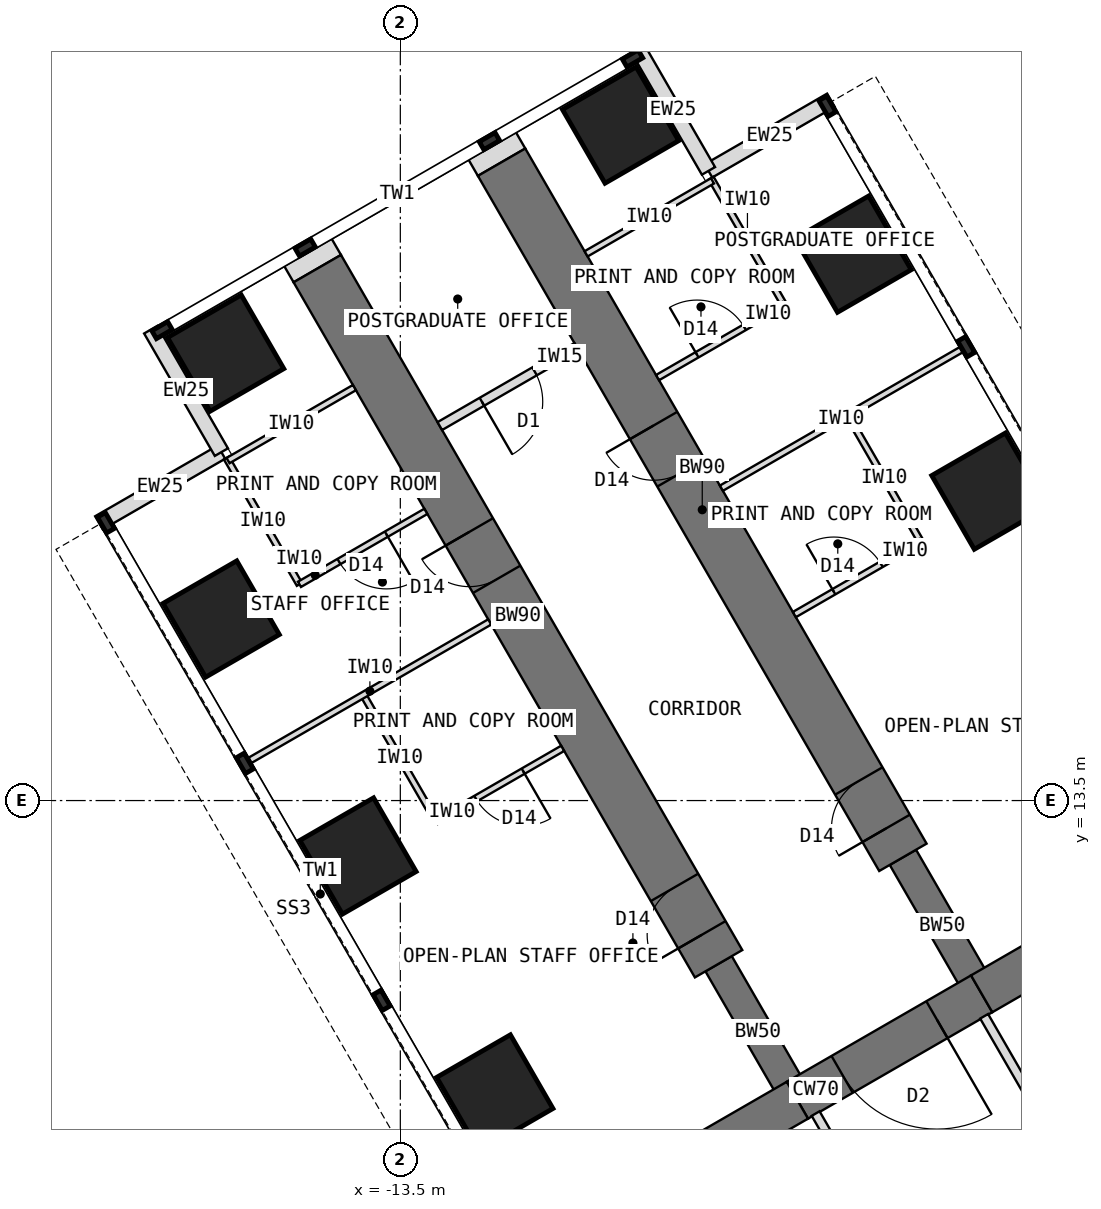
"""IFC4 building model, lengths in metres.
Left out: names, types, materials, properties, quantities, classifications, styles, units other than length and angle.
Written with IfcOpenShell. Run it as: python <this file> out.ifc"""

import sys

from ifc_helpers import new_model, si_unit, direction, frame, frame_2d, origin, origin_2d, place, context, subcontext, project, spatial, rectangle, extrude, element, fill, save


model = new_model("IFC4")
c1 = context("Model", 3, precision=1e-05, world=origin(), true_north=direction((0.0, 1.0)))
c2 = subcontext(c1, "Body", "Model", "MODEL_VIEW")
j1 = project(units=[si_unit("LENGTHUNIT", "METRE"), si_unit("PLANEANGLEUNIT", "RADIAN")], contexts=[c1])
p1 = place(None, origin())
s1 = spatial("IfcSite", under=j1, at=p1, CompositionType="ELEMENT")
p2 = place(p1, origin())
s2 = spatial("IfcBuilding", under=s1, at=p2, CompositionType="ELEMENT")
p3 = place(p2, frame((0.0, 0.0, 72.5)))
s3 = spatial("IfcBuildingStorey", under=s2, at=p3, CompositionType="ELEMENT", Elevation=72.5)
p4 = place(p3, frame((0.0, 12.596, 0.0), z_axis=(0.0, 0.0, 1.0), x_axis=(-0.866011268655, -0.500024481964, 0.0)))
e1 = element("IfcWall", 1, at=p4, inside=s3, PredefinedType="SHEAR", context=c2, shape_type="SweptSolid", body=[
    extrude(rectangle(XDim=4.548, YDim=0.7, at=frame_2d((2.274, 0.0))), origin(), (0.0, 0.0, 1.0), 4.0),
])
p5 = place(p3, frame((-3.939, 10.322, 0.0), z_axis=(0.0, 0.0, 1.0), x_axis=(-0.866019471182, -0.500010275428, 0.0)))
e2 = element("IfcWall", 2, at=p5, inside=s3, PredefinedType="SHEAR", context=c2, shape_type="SweptSolid", body=[
    extrude(rectangle(XDim=3.5, YDim=0.7, at=frame_2d((1.75, 0.0))), origin(), (0.0, 0.0, 1.0), 4.0),
])
p6 = place(p5, frame((0.85, 0.0, 0.0)))
e3 = element("IfcOpeningElement", 3, at=p6, cuts=e2, PredefinedType="OPENING", context=c2, shape_type="SweptSolid", body=[
    extrude(rectangle(XDim=1.8, YDim=2.1, at=frame_2d((0.9, 1.05))), frame((0.0, 0.36, 0.0), z_axis=(0.0, -1.0, 0.0), x_axis=(1.0, 0.0, 0.0)), (0.0, 0.0, 1.0), 0.72),
])
p7 = place(p3, frame((-6.97, 8.572, 0.0), z_axis=(0.0, 0.0, 1.0), x_axis=(-0.866034513004, -0.499984222037, 0.0)))
e4 = element("IfcWall", 4, at=p7, inside=s3, PredefinedType="SHEAR", context=c2, shape_type="SweptSolid", body=[
    extrude(rectangle(XDim=4.548, YDim=0.7, at=frame_2d((2.274, 0.0))), origin(), (0.0, 0.0, 1.0), 4.0),
])
p8 = place(p3, frame((-6.97, 8.572, 0.0), z_axis=(0.0, 0.0, 1.0), x_axis=(-0.499988811324, 0.866031863473, 0.0)))
e5 = element("IfcWall", 5, at=p8, inside=s3, PredefinedType="SHEAR", context=c2, shape_type="SweptSolid", body=[
    extrude(rectangle(XDim=2.592, YDim=0.5, at=frame_2d((1.296, 0.0))), origin(), (0.0, 0.0, 1.0), 4.0),
])
p9 = place(p3, frame((-8.266, 10.816, 0.0), z_axis=(0.0, 0.0, 1.0), x_axis=(-0.499996231654, 0.866027579429, 0.0)))
e6 = element("IfcWall", 6, at=p9, inside=s3, PredefinedType="SHEAR", context=c2, shape_type="SweptSolid", body=[
    extrude(rectangle(XDim=13.2, YDim=0.9, at=frame_2d((6.6, 0.0))), origin(), (0.0, 0.0, 1.0), 4.0),
])
p10 = place(p9, frame((0.55, 0.0, 0.0)))
e7 = element("IfcOpeningElement", 7, at=p10, cuts=e6, PredefinedType="OPENING", context=c2, shape_type="SweptSolid", body=[
    extrude(rectangle(XDim=0.9, YDim=2.1, at=frame_2d((0.45, 1.05))), frame((0.0, 0.46, 0.0), z_axis=(0.0, -1.0, 0.0), x_axis=(1.0, 0.0, 0.0)), (0.0, 0.0, 1.0), 0.92),
])
p11 = place(p9, frame((7.3, 0.0, 0.0)))
e8 = element("IfcOpeningElement", 8, at=p11, cuts=e6, PredefinedType="OPENING", context=c2, shape_type="SweptSolid", body=[
    extrude(rectangle(XDim=0.9, YDim=2.1, at=frame_2d((0.45, 1.05))), frame((0.0, 0.46, 0.0), z_axis=(0.0, -1.0, 0.0), x_axis=(1.0, 0.0, 0.0)), (0.0, 0.0, 1.0), 0.92),
])
p12 = place(p3, frame((-3.939, 10.322, 0.0), z_axis=(0.0, 0.0, 1.0), x_axis=(-0.499918158782, 0.866072649678, 0.0)))
e9 = element("IfcWall", 9, at=p12, inside=s3, PredefinedType="SHEAR", context=c2, shape_type="SweptSolid", body=[
    extrude(rectangle(XDim=2.592, YDim=0.5, at=frame_2d((1.296, 0.0))), origin(), (0.0, 0.0, 1.0), 4.0),
])
p13 = place(p3, frame((-5.234, 12.566, 0.0), z_axis=(0.0, 0.0, 1.0), x_axis=(-0.500010103361, 0.866019570528, 0.0)))
e10 = element("IfcWall", 10, at=p13, inside=s3, PredefinedType="SHEAR", context=c2, shape_type="SweptSolid", body=[
    extrude(rectangle(XDim=13.2, YDim=0.9, at=frame_2d((6.6, 0.0))), origin(), (0.0, 0.0, 1.0), 4.0),
])
p14 = place(p13, frame((0.55, 0.0, 0.0)))
e11 = element("IfcOpeningElement", 11, at=p14, cuts=e10, PredefinedType="OPENING", context=c2, shape_type="SweptSolid", body=[
    extrude(rectangle(XDim=0.9, YDim=2.1, at=frame_2d((0.45, 1.05))), frame((0.0, 0.46, 0.0), z_axis=(0.0, -1.0, 0.0), x_axis=(1.0, 0.0, 0.0)), (0.0, 0.0, 1.0), 0.92),
])
p15 = place(p13, frame((7.3, 0.0, 0.0)))
e12 = element("IfcOpeningElement", 12, at=p15, cuts=e10, PredefinedType="OPENING", context=c2, shape_type="SweptSolid", body=[
    extrude(rectangle(XDim=0.9, YDim=2.1, at=frame_2d((0.45, 1.05))), frame((0.0, 0.46, 0.0), z_axis=(0.0, -1.0, 0.0), x_axis=(1.0, 0.0, 0.0)), (0.0, 0.0, 1.0), 0.92),
])
for number, where, z_axis, x_axis in (
    (13, (-11.946, 8.691, 0.0), (0.0, 0.0, 1.0), (0.866, 0.5, 0.0)),
    (14, (-14.196, 12.588, 0.0), (0.0, 0.0, 1.0), (0.866, 0.5, 0.0)),
    (15, (-3.804, 18.588, 0.0), (0.0, 0.0, 1.0), (0.866, 0.5, 0.0)),
    (16, (-16.446, 16.486, 0.0), (0.0, 0.0, 1.0), (0.866, 0.5, 0.0)),
    (17, (-6.054, 22.486, 0.0), (0.0, 0.0, 1.0), (0.866, 0.5, 0.0)),
    (18, (-16.373, 20.858, 0.0), (0.0, 0.0, 1.0), (0.866, 0.5, 0.0)),
    (19, (-9.877, 24.608, 0.0), (0.0, 0.0, 1.0), (0.866, 0.5, 0.0)),
):
    element("IfcColumn", number, at=place(p3, frame(where, z_axis=z_axis, x_axis=x_axis)), inside=s3, PredefinedType="COLUMN", context=c2, shape_type="SweptSolid", body=[
        extrude(rectangle(XDim=1.4, YDim=1.4, at=origin_2d()), origin(), (0.0, 0.0, 1.0), 4.0),
    ])
for number, where, z_axis, x_axis in (
    (20, (-18.456, 18.067, 0.0), (0.0, 0.0, 1.0), (0.866, 0.5, 0.0)),
    (21, (-16.443, 19.23, 0.0), (0.0, 0.0, 1.0), (-0.5, 0.866, 0.0)),
    (22, (-6.419, 25.017, 0.0), (0.0, 0.0, 1.0), (-0.866, -0.5, 0.0)),
    (23, (-8.432, 23.855, 0.0), (0.0, 0.0, 1.0), (-0.5, 0.866, 0.0)),
):
    element("IfcWall", number, at=place(p3, frame(where, z_axis=z_axis, x_axis=x_axis)), inside=s3, PredefinedType="STANDARD", context=c2, shape_type="SweptSolid", body=[
        extrude(rectangle(XDim=2.325, YDim=0.25, at=frame_2d((1.163, 0.0))), origin(), (0.0, 0.0, 1.0), 3.8),
    ])
for number, where, z_axis, x_axis in (
    (24, (-14.865, 22.248, 0.0), (0.0, 0.0, 1.0), (-0.5, 0.866, 0.0)),
    (25, (-11.834, 23.998, 0.0), (0.0, 0.0, 1.0), (-0.5, 0.866, 0.0)),
):
    element("IfcWall", number, at=place(p3, frame(where, z_axis=z_axis, x_axis=x_axis)), inside=s3, PredefinedType="PARTITIONING", context=c2, shape_type="SweptSolid", body=[
        extrude(rectangle(XDim=0.31, YDim=0.9, at=frame_2d((0.155, 0.0))), origin(), (0.0, 0.0, 1.0), 3.8),
    ])
p16 = place(p3, frame((-12.03, 16.437, 0.0), z_axis=(0.0, 0.0, 1.0), x_axis=(-0.866035472144, -0.499982560684, 0.0)))
e26 = element("IfcWall", 26, at=p16, inside=s3, PredefinedType="PARTITIONING", context=c2, shape_type="SweptSolid", body=[
    extrude(rectangle(XDim=4.55, YDim=0.1, at=frame_2d((2.275, 0.0))), origin(), (0.0, 0.0, 1.0), 3.8),
])
p17 = place(p3, frame((-12.909, 13.158, 0.0), z_axis=(0.0, 0.0, 1.0), x_axis=(-0.499957262057, 0.866050077142, 0.0)))
e27 = element("IfcWall", 27, at=p17, inside=s3, PredefinedType="PARTITIONING", context=c2, shape_type="SweptSolid", body=[
    extrude(rectangle(XDim=2.4, YDim=0.1, at=frame_2d((1.2, 0.0))), origin(), (0.0, 0.0, 1.0), 3.8),
])
p18 = place(p3, frame((-10.83, 14.359, 0.0), z_axis=(0.0, 0.0, 1.0), x_axis=(-0.865980596518, -0.500077600433, 0.0)))
e28 = element("IfcWall", 28, at=p18, inside=s3, PredefinedType="PARTITIONING", context=c2, shape_type="SweptSolid", body=[
    extrude(rectangle(XDim=2.4, YDim=0.1, at=frame_2d((1.2, 0.0))), origin(), (0.0, 0.0, 1.0), 3.8),
])
p19 = place(p18, frame((0.75, 0.0, 0.0)))
e29 = element("IfcOpeningElement", 29, at=p19, cuts=e28, PredefinedType="OPENING", context=c2, shape_type="SweptSolid", body=[
    extrude(rectangle(XDim=0.9, YDim=2.1, at=frame_2d((0.45, 1.05))), frame((0.0, 0.06, 0.0), z_axis=(0.0, -1.0, 0.0), x_axis=(1.0, 0.0, 0.0)), (0.0, 0.0, 1.0), 0.12),
])
p20 = place(p3, frame((-15.159, 17.056, 0.0), z_axis=(0.0, 0.0, 1.0), x_axis=(-0.500001309137, 0.866024647952, 0.0)))
e30 = element("IfcWall", 30, at=p20, inside=s3, PredefinedType="PARTITIONING", context=c2, shape_type="SweptSolid", body=[
    extrude(rectangle(XDim=2.4, YDim=0.1, at=frame_2d((1.2, 0.0))), origin(), (0.0, 0.0, 1.0), 3.8),
])
p21 = place(p3, frame((-13.08, 18.256, 0.0), z_axis=(0.0, 0.0, 1.0), x_axis=(-0.866024647952, -0.500001309137, 0.0)))
e31 = element("IfcWall", 31, at=p21, inside=s3, PredefinedType="PARTITIONING", context=c2, shape_type="SweptSolid", body=[
    extrude(rectangle(XDim=2.4, YDim=0.1, at=frame_2d((1.2, 0.0))), origin(), (0.0, 0.0, 1.0), 3.8),
])
p22 = place(p21, frame((0.75, 0.0, 0.0)))
e32 = element("IfcOpeningElement", 32, at=p22, cuts=e31, PredefinedType="OPENING", context=c2, shape_type="SweptSolid", body=[
    extrude(rectangle(XDim=0.9, YDim=2.1, at=frame_2d((0.45, 1.05))), frame((0.0, 0.06, 0.0), z_axis=(0.0, -1.0, 0.0), x_axis=(1.0, 0.0, 0.0)), (0.0, 0.0, 1.0), 0.12),
])
p23 = place(p3, frame((-14.255, 20.291, 0.0), z_axis=(0.0, 0.0, 1.0), x_axis=(-0.866024647952, -0.500001309137, 0.0)))
e33 = element("IfcWall", 33, at=p23, inside=s3, PredefinedType="PARTITIONING", context=c2, shape_type="SweptSolid", body=[
    extrude(rectangle(XDim=2.4, YDim=0.1, at=frame_2d((1.2, 0.0))), origin(), (0.0, 0.0, 1.0), 3.8),
])
p24 = place(p3, frame((-8.22, 18.637, 0.0), z_axis=(0.0, 0.0, 1.0), x_axis=(0.866012237902, 0.500022803284, 0.0)))
e34 = element("IfcWall", 34, at=p24, inside=s3, PredefinedType="PARTITIONING", context=c2, shape_type="SweptSolid", body=[
    extrude(rectangle(XDim=4.55, YDim=0.1, at=frame_2d((2.275, 0.0))), origin(), (0.0, 0.0, 1.0), 3.8),
])
p25 = place(p3, frame((-4.941, 17.759, 0.0), z_axis=(0.0, 0.0, 1.0), x_axis=(-0.500077600433, 0.865980596518, 0.0)))
e35 = element("IfcWall", 35, at=p25, inside=s3, PredefinedType="PARTITIONING", context=c2, shape_type="SweptSolid", body=[
    extrude(rectangle(XDim=2.4, YDim=0.1, at=frame_2d((1.2, 0.0))), origin(), (0.0, 0.0, 1.0), 3.8),
])
p26 = place(p3, frame((-7.02, 16.559, 0.0), z_axis=(0.0, 0.0, 1.0), x_axis=(0.866050077142, 0.499957262057, 0.0)))
e36 = element("IfcWall", 36, at=p26, inside=s3, PredefinedType="PARTITIONING", context=c2, shape_type="SweptSolid", body=[
    extrude(rectangle(XDim=2.4, YDim=0.1, at=frame_2d((1.2, 0.0))), origin(), (0.0, 0.0, 1.0), 3.8),
])
p27 = place(p26, frame((0.75, 0.0, 0.0)))
e37 = element("IfcOpeningElement", 37, at=p27, cuts=e36, PredefinedType="OPENING", context=c2, shape_type="SweptSolid", body=[
    extrude(rectangle(XDim=0.9, YDim=2.1, at=frame_2d((0.45, 1.05))), frame((0.0, 0.06, 0.0), z_axis=(0.0, -1.0, 0.0), x_axis=(1.0, 0.0, 0.0)), (0.0, 0.0, 1.0), 0.12),
])
p28 = place(p3, frame((-7.191, 21.656, 0.0), z_axis=(0.0, 0.0, 1.0), x_axis=(-0.500077600433, 0.865980596518, 0.0)))
e38 = element("IfcWall", 38, at=p28, inside=s3, PredefinedType="PARTITIONING", context=c2, shape_type="SweptSolid", body=[
    extrude(rectangle(XDim=2.4, YDim=0.1, at=frame_2d((1.2, 0.0))), origin(), (0.0, 0.0, 1.0), 3.8),
])
p29 = place(p3, frame((-9.27, 20.456, 0.0), z_axis=(0.0, 0.0, 1.0), x_axis=(0.866006032174, 0.500033551112, 0.0)))
e39 = element("IfcWall", 39, at=p29, inside=s3, PredefinedType="PARTITIONING", context=c2, shape_type="SweptSolid", body=[
    extrude(rectangle(XDim=2.4, YDim=0.1, at=frame_2d((1.2, 0.0))), origin(), (0.0, 0.0, 1.0), 3.8),
])
p30 = place(p29, frame((0.75, 0.0, 0.0)))
e40 = element("IfcOpeningElement", 40, at=p30, cuts=e39, PredefinedType="OPENING", context=c2, shape_type="SweptSolid", body=[
    extrude(rectangle(XDim=0.9, YDim=2.1, at=frame_2d((0.45, 1.05))), frame((0.0, 0.06, 0.0), z_axis=(0.0, -1.0, 0.0), x_axis=(1.0, 0.0, 0.0)), (0.0, 0.0, 1.0), 0.12),
])
p31 = place(p3, frame((-10.445, 22.491, 0.0), z_axis=(0.0, 0.0, 1.0), x_axis=(0.866006032174, 0.500033551112, 0.0)))
e41 = element("IfcWall", 41, at=p31, inside=s3, PredefinedType="PARTITIONING", context=c2, shape_type="SweptSolid", body=[
    extrude(rectangle(XDim=2.4, YDim=0.1, at=frame_2d((1.2, 0.0))), origin(), (0.0, 0.0, 1.0), 3.8),
])
p32 = place(p3, frame((-4.436, 4.483, 0.0), z_axis=(0.0, 0.0, 1.0), x_axis=(-0.500017246033, 0.866015446554, 0.0)))
e42 = element("IfcWall", 42, at=p32, inside=s3, PredefinedType="PARTITIONING", context=c2, shape_type="SweptSolid", body=[
    extrude(rectangle(XDim=4.469, YDim=0.15, at=frame_2d((2.234, 0.0))), origin(), (0.0, 0.0, 1.0), 3.8),
])
p33 = place(p32, frame((1.744, 0.0, 0.0)))
e43 = element("IfcOpeningElement", 43, at=p33, cuts=e42, PredefinedType="OPENING", context=c2, shape_type="SweptSolid", body=[
    extrude(rectangle(XDim=1.0, YDim=2.1, at=frame_2d((0.5, 1.05))), frame((0.0, 0.085, 0.0), z_axis=(0.0, -1.0, 0.0), x_axis=(1.0, 0.0, 0.0)), (0.0, 0.0, 1.0), 0.17),
])
p34 = place(p3, frame((-3.898, 9.952, 0.0), z_axis=(0.0, 0.0, 1.0), x_axis=(0.499999927604, -0.866025445582, 0.0)))
e44 = element("IfcWall", 44, at=p34, inside=s3, PredefinedType="PARTITIONING", context=c2, shape_type="SweptSolid", body=[
    extrude(rectangle(XDim=4.468, YDim=0.15, at=frame_2d((2.234, 0.0))), origin(), (0.0, 0.0, 1.0), 3.8),
])
p35 = place(p34, frame((1.724, 0.0, 0.0)))
e45 = element("IfcOpeningElement", 45, at=p35, cuts=e44, PredefinedType="OPENING", context=c2, shape_type="SweptSolid", body=[
    extrude(rectangle(XDim=1.0, YDim=2.1, at=frame_2d((0.5, 1.05))), frame((0.0, 0.085, 0.0), z_axis=(0.0, -1.0, 0.0), x_axis=(1.0, 0.0, 0.0)), (0.0, 0.0, 1.0), 0.17),
])
p36 = place(p3, frame((-10.599, 20.958, 0.0), z_axis=(0.0, 0.0, 1.0), x_axis=(-0.866021400173, -0.500006934395, 0.0)))
e46 = element("IfcWall", 46, at=p36, inside=s3, PredefinedType="PARTITIONING", context=c2, shape_type="SweptSolid", body=[
    extrude(rectangle(XDim=2.6, YDim=0.15, at=frame_2d((1.3, 0.0))), origin(), (0.0, 0.0, 1.0), 3.8),
])
p37 = place(p36, frame((0.8, 0.0, 0.0)))
e47 = element("IfcOpeningElement", 47, at=p37, cuts=e46, PredefinedType="OPENING", context=c2, shape_type="SweptSolid", body=[
    extrude(rectangle(XDim=1.0, YDim=2.1, at=frame_2d((0.5, 1.05))), frame((0.0, 0.085, 0.0), z_axis=(0.0, -1.0, 0.0), x_axis=(1.0, 0.0, 0.0)), (0.0, 0.0, 1.0), 0.17),
])
p38 = place(p6, origin())
e48 = element("IfcDoor", 48, at=p38, inside=s3, OperationType="DOUBLE_DOOR_DOUBLE_SWING", PredefinedType="DOOR", context=c2, shape_type="SweptSolid", body=[
    extrude(rectangle(XDim=1.72, YDim=2.06, at=frame_2d((0.9, 1.03))), frame((0.0, 0.025, 0.0), z_axis=(0.0, -1.0, 0.0), x_axis=(1.0, 0.0, 0.0)), (0.0, 0.0, 1.0), 0.05),
    extrude(rectangle(XDim=0.04, YDim=2.1, at=frame_2d((0.02, 1.05))), frame((0.0, 0.35, 0.0), z_axis=(0.0, -1.0, 0.0), x_axis=(1.0, 0.0, 0.0)), (0.0, 0.0, 1.0), 0.699),
    extrude(rectangle(XDim=0.04, YDim=2.1, at=frame_2d((1.78, 1.05))), frame((0.0, 0.35, 0.0), z_axis=(0.0, -1.0, 0.0), x_axis=(1.0, 0.0, 0.0)), (0.0, 0.0, 1.0), 0.699),
    extrude(rectangle(XDim=1.72, YDim=0.04, at=frame_2d((0.9, 2.08))), frame((0.0, 0.35, 0.0), z_axis=(0.0, -1.0, 0.0), x_axis=(1.0, 0.0, 0.0)), (0.0, 0.0, 1.0), 0.699),
])
fill(e3, e48)
p39 = place(p19, origin())
e49 = element("IfcDoor", 49, at=p39, inside=s3, OperationType="SINGLE_SWING_LEFT", PredefinedType="DOOR", context=c2, shape_type="SweptSolid", body=[
    extrude(rectangle(XDim=0.9, YDim=2.1, at=frame_2d((0.45, 1.05))), frame((0.0, 0.025, 0.0), z_axis=(0.0, -1.0, 0.0), x_axis=(1.0, 0.0, 0.0)), (0.0, 0.0, 1.0), 0.05),
])
fill(e29, e49)
p40 = place(p22, origin())
e50 = element("IfcDoor", 50, at=p40, inside=s3, OperationType="SINGLE_SWING_LEFT", PredefinedType="DOOR", context=c2, shape_type="SweptSolid", body=[
    extrude(rectangle(XDim=0.9, YDim=2.1, at=frame_2d((0.45, 1.05))), frame((0.0, 0.025, 0.0), z_axis=(0.0, -1.0, 0.0), x_axis=(1.0, 0.0, 0.0)), (0.0, 0.0, 1.0), 0.05),
])
fill(e32, e50)
p41 = place(p27, origin())
e51 = element("IfcDoor", 51, at=p41, inside=s3, OperationType="SINGLE_SWING_LEFT", PredefinedType="DOOR", context=c2, shape_type="SweptSolid", body=[
    extrude(rectangle(XDim=0.9, YDim=2.1, at=frame_2d((0.45, 1.05))), frame((0.0, 0.025, 0.0), z_axis=(0.0, -1.0, 0.0), x_axis=(1.0, 0.0, 0.0)), (0.0, 0.0, 1.0), 0.05),
])
fill(e37, e51)
p42 = place(p30, origin())
e52 = element("IfcDoor", 52, at=p42, inside=s3, OperationType="SINGLE_SWING_LEFT", PredefinedType="DOOR", context=c2, shape_type="SweptSolid", body=[
    extrude(rectangle(XDim=0.9, YDim=2.1, at=frame_2d((0.45, 1.05))), frame((0.0, 0.025, 0.0), z_axis=(0.0, -1.0, 0.0), x_axis=(1.0, 0.0, 0.0)), (0.0, 0.0, 1.0), 0.05),
])
fill(e40, e52)
p43 = place(p37, origin())
e53 = element("IfcDoor", 53, at=p43, inside=s3, OperationType="SINGLE_SWING_RIGHT", PredefinedType="DOOR", context=c2, shape_type="SweptSolid", body=[
    extrude(rectangle(XDim=1.0, YDim=2.1, at=frame_2d((0.5, 1.05))), frame((0.0, 0.025, 0.0), z_axis=(0.0, -1.0, 0.0), x_axis=(1.0, 0.0, 0.0)), (0.0, 0.0, 1.0), 0.05),
])
fill(e47, e53)
p44 = place(p10, origin())
e54 = element("IfcDoor", 54, at=p44, inside=s3, OperationType="SINGLE_SWING_LEFT", PredefinedType="DOOR", context=c2, shape_type="SweptSolid", body=[
    extrude(rectangle(XDim=0.82, YDim=2.06, at=frame_2d((0.45, 1.03))), frame((0.0, 0.025, 0.0), z_axis=(0.0, -1.0, 0.0), x_axis=(1.0, 0.0, 0.0)), (0.0, 0.0, 1.0), 0.05),
    extrude(rectangle(XDim=0.04, YDim=2.1, at=frame_2d((0.02, 1.05))), frame((0.0, 0.45, 0.0), z_axis=(0.0, -1.0, 0.0), x_axis=(1.0, 0.0, 0.0)), (0.0, 0.0, 1.0), 0.899),
    extrude(rectangle(XDim=0.04, YDim=2.1, at=frame_2d((0.88, 1.05))), frame((0.0, 0.45, 0.0), z_axis=(0.0, -1.0, 0.0), x_axis=(1.0, 0.0, 0.0)), (0.0, 0.0, 1.0), 0.899),
    extrude(rectangle(XDim=0.82, YDim=0.04, at=frame_2d((0.45, 2.08))), frame((0.0, 0.45, 0.0), z_axis=(0.0, -1.0, 0.0), x_axis=(1.0, 0.0, 0.0)), (0.0, 0.0, 1.0), 0.899),
])
fill(e7, e54)
p45 = place(p11, origin())
e55 = element("IfcDoor", 55, at=p45, inside=s3, OperationType="SINGLE_SWING_RIGHT", PredefinedType="DOOR", context=c2, shape_type="SweptSolid", body=[
    extrude(rectangle(XDim=0.82, YDim=2.06, at=frame_2d((0.45, 1.03))), frame((0.0, 0.025, 0.0), z_axis=(0.0, -1.0, 0.0), x_axis=(1.0, 0.0, 0.0)), (0.0, 0.0, 1.0), 0.05),
    extrude(rectangle(XDim=0.04, YDim=2.1, at=frame_2d((0.02, 1.05))), frame((0.0, 0.45, 0.0), z_axis=(0.0, -1.0, 0.0), x_axis=(1.0, 0.0, 0.0)), (0.0, 0.0, 1.0), 0.899),
    extrude(rectangle(XDim=0.04, YDim=2.1, at=frame_2d((0.88, 1.05))), frame((0.0, 0.45, 0.0), z_axis=(0.0, -1.0, 0.0), x_axis=(1.0, 0.0, 0.0)), (0.0, 0.0, 1.0), 0.899),
    extrude(rectangle(XDim=0.82, YDim=0.04, at=frame_2d((0.45, 2.08))), frame((0.0, 0.45, 0.0), z_axis=(0.0, -1.0, 0.0), x_axis=(1.0, 0.0, 0.0)), (0.0, 0.0, 1.0), 0.899),
])
fill(e8, e55)
p46 = place(p14, origin())
e56 = element("IfcDoor", 56, at=p46, inside=s3, OperationType="SINGLE_SWING_LEFT", PredefinedType="DOOR", context=c2, shape_type="SweptSolid", body=[
    extrude(rectangle(XDim=0.82, YDim=2.06, at=frame_2d((0.45, 1.03))), frame((0.0, 0.025, 0.0), z_axis=(0.0, -1.0, 0.0), x_axis=(1.0, 0.0, 0.0)), (0.0, 0.0, 1.0), 0.05),
    extrude(rectangle(XDim=0.04, YDim=2.1, at=frame_2d((0.02, 1.05))), frame((0.0, 0.45, 0.0), z_axis=(0.0, -1.0, 0.0), x_axis=(1.0, 0.0, 0.0)), (0.0, 0.0, 1.0), 0.899),
    extrude(rectangle(XDim=0.04, YDim=2.1, at=frame_2d((0.88, 1.05))), frame((0.0, 0.45, 0.0), z_axis=(0.0, -1.0, 0.0), x_axis=(1.0, 0.0, 0.0)), (0.0, 0.0, 1.0), 0.899),
    extrude(rectangle(XDim=0.82, YDim=0.04, at=frame_2d((0.45, 2.08))), frame((0.0, 0.45, 0.0), z_axis=(0.0, -1.0, 0.0), x_axis=(1.0, 0.0, 0.0)), (0.0, 0.0, 1.0), 0.899),
])
fill(e11, e56)
p47 = place(p15, origin())
e57 = element("IfcDoor", 57, at=p47, inside=s3, OperationType="SINGLE_SWING_RIGHT", PredefinedType="DOOR", context=c2, shape_type="SweptSolid", body=[
    extrude(rectangle(XDim=0.82, YDim=2.06, at=frame_2d((0.45, 1.03))), frame((0.0, 0.025, 0.0), z_axis=(0.0, -1.0, 0.0), x_axis=(1.0, 0.0, 0.0)), (0.0, 0.0, 1.0), 0.05),
    extrude(rectangle(XDim=0.04, YDim=2.1, at=frame_2d((0.02, 1.05))), frame((0.0, 0.45, 0.0), z_axis=(0.0, -1.0, 0.0), x_axis=(1.0, 0.0, 0.0)), (0.0, 0.0, 1.0), 0.899),
    extrude(rectangle(XDim=0.04, YDim=2.1, at=frame_2d((0.88, 1.05))), frame((0.0, 0.45, 0.0), z_axis=(0.0, -1.0, 0.0), x_axis=(1.0, 0.0, 0.0)), (0.0, 0.0, 1.0), 0.899),
    extrude(rectangle(XDim=0.82, YDim=0.04, at=frame_2d((0.45, 2.08))), frame((0.0, 0.45, 0.0), z_axis=(0.0, -1.0, 0.0), x_axis=(1.0, 0.0, 0.0)), (0.0, 0.0, 1.0), 0.899),
])
fill(e12, e57)
save(model, sys.argv[1])
